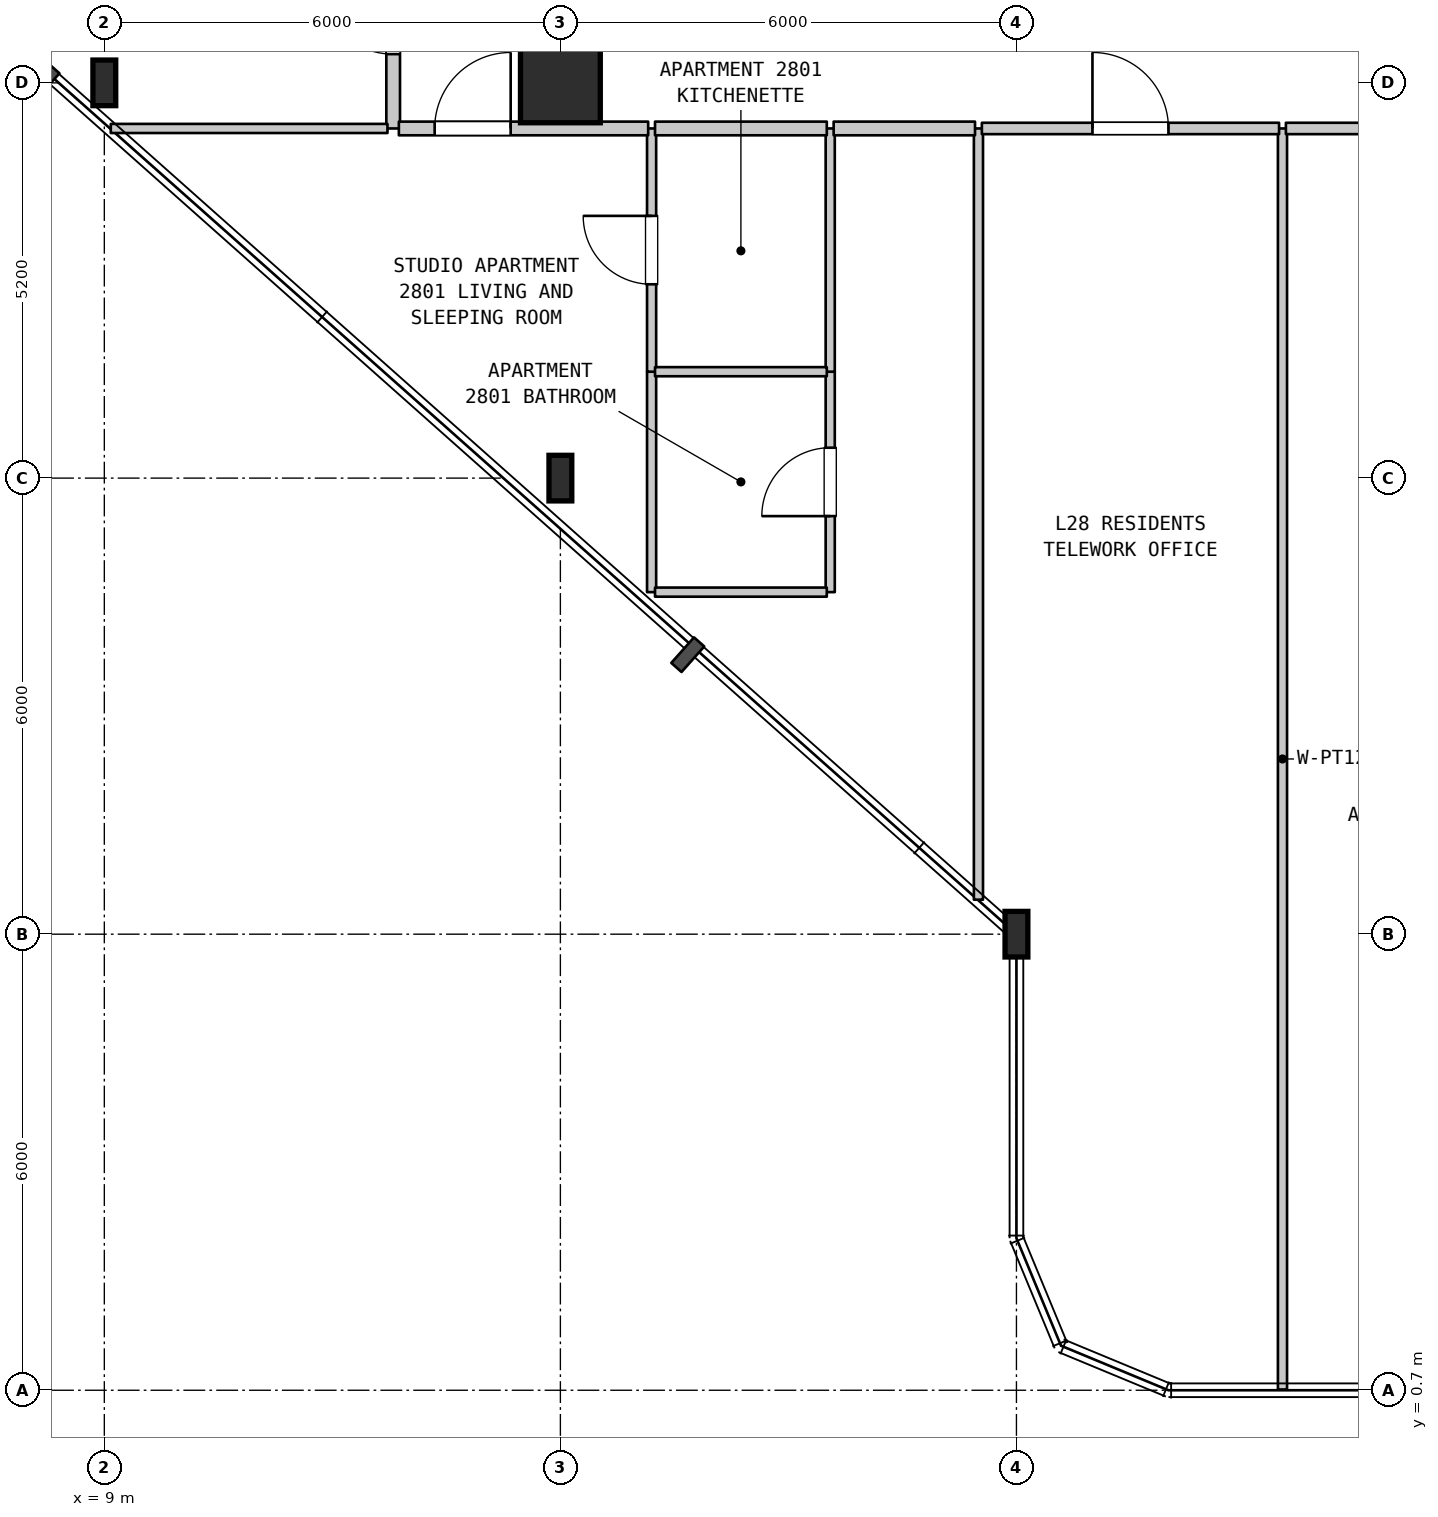
"""IFC4 building model, lengths in metres.
Left out: names, types, materials, properties, quantities, classifications, styles, units other than length and angle.
Written with IfcOpenShell. Run it as: python <this file> out.ifc"""

import sys

from ifc_helpers import new_model, si_unit, direction, frame, frame_2d, origin, origin_2d, place, context, subcontext, project, spatial, rectangle, i_section, extrude, element, fill, save


model = new_model("IFC4")
c1 = context("Model", 3, precision=1e-05, world=origin(), true_north=direction((0.0, 1.0)))
c2 = subcontext(c1, "Body", "Model", "MODEL_VIEW")
j1 = project(units=[si_unit("LENGTHUNIT", "METRE"), si_unit("PLANEANGLEUNIT", "RADIAN")], contexts=[c1])
p1 = place(None, origin())
s1 = spatial("IfcSite", under=j1, at=p1, CompositionType="ELEMENT")
p2 = place(p1, origin())
s2 = spatial("IfcBuilding", under=s1, at=p2, CompositionType="ELEMENT")
p3 = place(p2, frame((0.0, 0.0, 116.8)))
s3 = spatial("IfcBuildingStorey", under=s2, at=p3, CompositionType="ELEMENT", Elevation=116.8)
for number, where, z_axis, x_axis in (
    (1, (9.0, 17.9, 0.0), (0.0, 0.0, 1.0), (1.0, 0.0, 0.0)),
    (2, (15.0, 12.7, 0.0), (0.0, 0.0, 1.0), (1.0, 0.0, 0.0)),
):
    element("IfcColumn", number, at=place(p3, frame(where, z_axis=z_axis, x_axis=x_axis)), inside=s3, PredefinedType="COLUMN", context=c2, shape_type="SweptSolid", body=[
        extrude(i_section(OverallWidth=0.3, OverallDepth=0.6, WebThickness=0.015, FlangeThickness=0.03, FilletRadius=0.027, at=origin_2d()), origin(), (0.0, 0.0, 1.0), 3.7),
    ])
p4 = place(p3, frame((15.0, 17.9, 0.0), z_axis=(0.0, 0.0, 1.0), x_axis=(1.0, 0.0, 0.0)))
e3 = element("IfcColumn", 3, at=p4, inside=s3, PredefinedType="COLUMN", context=c2, shape_type="SweptSolid", body=[
    extrude(rectangle(XDim=1.05, YDim=1.05, at=origin_2d()), origin(), (0.0, 0.0, 1.0), 3.7),
])
p5 = place(p3, frame((21.0, 6.7, 0.0), z_axis=(0.0, 0.0, 1.0), x_axis=(1.0, 0.0, 0.0)))
e4 = element("IfcColumn", 4, at=p5, inside=s3, PredefinedType="COLUMN", context=c2, shape_type="SweptSolid", body=[
    extrude(i_section(OverallWidth=0.3, OverallDepth=0.6, WebThickness=0.015, FlangeThickness=0.03, FilletRadius=0.027, at=origin_2d()), origin(), (0.0, 0.0, 1.0), 3.7),
])
p6 = place(p3, frame((12.8, 17.3, 0.0), z_axis=(0.0, 0.0, 1.0), x_axis=(0.0, 1.0, 0.0)))
e5 = element("IfcWall", 5, at=p6, inside=s3, PredefinedType="STANDARD", context=c2, shape_type="SweptSolid", body=[
    extrude(rectangle(XDim=3.1, YDim=0.18, at=frame_2d((1.55, 0.0))), origin(), (0.0, 0.0, 1.0), 3.38),
])
p7 = place(p6, frame((0.978, 0.0, 0.0)))
e6 = element("IfcOpeningElement", 6, at=p7, cuts=e5, PredefinedType="OPENING", context=c2, shape_type="SweptSolid", body=[
    extrude(rectangle(XDim=1.0, YDim=2.15, at=frame_2d((0.5, 1.075))), frame((0.0, 0.1, 0.0), z_axis=(0.0, -1.0, 0.0), x_axis=(1.0, 0.0, 0.0)), (0.0, 0.0, 1.0), 0.2),
])
p8 = place(p3, frame((16.2, 11.2, 0.0), z_axis=(0.0, 0.0, 1.0), x_axis=(0.0, 1.0, 0.0)))
e7 = element("IfcWall", 7, at=p8, inside=s3, PredefinedType="PARTITIONING", context=c2, shape_type="SweptSolid", body=[
    extrude(rectangle(XDim=2.9, YDim=0.12, at=frame_2d((1.45, 0.0))), origin(), (0.0, 0.0, 1.0), 3.38),
])
p9 = place(p3, frame((16.2, 14.1, 0.0), z_axis=(0.0, 0.0, 1.0), x_axis=(0.0, 1.0, 0.0)))
e8 = element("IfcWall", 8, at=p9, inside=s3, PredefinedType="PARTITIONING", context=c2, shape_type="SweptSolid", body=[
    extrude(rectangle(XDim=3.2, YDim=0.12, at=frame_2d((1.6, 0.0))), origin(), (0.0, 0.0, 1.0), 3.38),
])
p10 = place(p9, frame((1.15, 0.0, 0.0)))
e9 = element("IfcOpeningElement", 9, at=p10, cuts=e8, PredefinedType="OPENING", context=c2, shape_type="SweptSolid", body=[
    extrude(rectangle(XDim=0.9, YDim=2.15, at=frame_2d((0.45, 1.075))), frame((0.0, 0.07, 0.0), z_axis=(0.0, -1.0, 0.0), x_axis=(1.0, 0.0, 0.0)), (0.0, 0.0, 1.0), 0.14),
])
p11 = place(p3, frame((18.55, 11.2, 0.0), z_axis=(0.0, 0.0, 1.0), x_axis=(0.0, 1.0, 0.0)))
e10 = element("IfcWall", 10, at=p11, inside=s3, PredefinedType="PARTITIONING", context=c2, shape_type="SweptSolid", body=[
    extrude(rectangle(XDim=2.9, YDim=0.12, at=frame_2d((1.45, 0.0))), origin(), (0.0, 0.0, 1.0), 3.38),
])
p12 = place(p11, frame((1.0, 0.0, 0.0)))
e11 = element("IfcOpeningElement", 11, at=p12, cuts=e10, PredefinedType="OPENING", context=c2, shape_type="SweptSolid", body=[
    extrude(rectangle(XDim=0.9, YDim=2.1, at=frame_2d((0.45, 1.05))), frame((0.0, 0.07, 0.0), z_axis=(0.0, -1.0, 0.0), x_axis=(1.0, 0.0, 0.0)), (0.0, 0.0, 1.0), 0.14),
])
p13 = place(p3, frame((18.55, 14.1, 0.0), z_axis=(0.0, 0.0, 1.0), x_axis=(0.0, 1.0, 0.0)))
e12 = element("IfcWall", 12, at=p13, inside=s3, PredefinedType="PARTITIONING", context=c2, shape_type="SweptSolid", body=[
    extrude(rectangle(XDim=3.2, YDim=0.12, at=frame_2d((1.6, 0.0))), origin(), (0.0, 0.0, 1.0), 3.38),
])
p14 = place(p3, frame((20.5, 7.154, 0.0), z_axis=(0.0, 0.0, 1.0), x_axis=(0.0, 1.0, 0.0)))
e13 = element("IfcWall", 13, at=p14, inside=s3, PredefinedType="PARTITIONING", context=c2, shape_type="SweptSolid", body=[
    extrude(rectangle(XDim=10.146, YDim=0.12, at=frame_2d((5.073, 0.0))), origin(), (0.0, 0.0, 1.0), 3.38),
])
p15 = place(p3, frame((24.5, 0.71, 0.0), z_axis=(0.0, 0.0, 1.0), x_axis=(0.0, 1.0, 0.0)))
e14 = element("IfcWall", 14, at=p15, inside=s3, PredefinedType="PARTITIONING", context=c2, shape_type="SweptSolid", body=[
    extrude(rectangle(XDim=16.59, YDim=0.12, at=frame_2d((8.295, 0.0))), origin(), (0.0, 0.0, 1.0), 3.38),
])
for number, where, z_axis, x_axis in (
    (15, (16.245, 11.2, 0.0), (0.0, 0.0, 1.0), (1.0, 0.0, 0.0)),
    (16, (16.245, 14.1, 0.0), (0.0, 0.0, 1.0), (1.0, 0.0, 0.0)),
):
    element("IfcWall", number, at=place(p3, frame(where, z_axis=z_axis, x_axis=x_axis)), inside=s3, PredefinedType="PARTITIONING", context=c2, shape_type="SweptSolid", body=[
        extrude(rectangle(XDim=2.26, YDim=0.12, at=frame_2d((1.13, 0.0))), origin(), (0.0, 0.0, 1.0), 3.38),
    ])
p16 = place(p3, frame((9.085, 17.3, 0.0), z_axis=(0.0, 0.0, 1.0), x_axis=(1.0, 0.0, 0.0)))
e17 = element("IfcWall", 17, at=p16, inside=s3, PredefinedType="PARTITIONING", context=c2, shape_type="SweptSolid", body=[
    extrude(rectangle(XDim=3.64, YDim=0.12, at=frame_2d((1.82, 0.0))), origin(), (0.0, 0.0, 1.0), 3.38),
])
p17 = place(p3, frame((12.875, 17.3, 0.0), z_axis=(0.0, 0.0, 1.0), x_axis=(1.0, 0.0, 0.0)))
e18 = element("IfcWall", 18, at=p17, inside=s3, PredefinedType="STANDARD", context=c2, shape_type="SweptSolid", body=[
    extrude(rectangle(XDim=3.28, YDim=0.18, at=frame_2d((1.64, 0.0))), origin(), (0.0, 0.0, 1.0), 3.38),
])
p18 = place(p17, frame((0.471, 0.0, 0.0)))
e19 = element("IfcOpeningElement", 19, at=p18, cuts=e18, PredefinedType="OPENING", context=c2, shape_type="SweptSolid", body=[
    extrude(rectangle(XDim=1.0, YDim=2.15, at=frame_2d((0.5, 1.075))), frame((0.0, 0.1, 0.0), z_axis=(0.0, -1.0, 0.0), x_axis=(1.0, 0.0, 0.0)), (0.0, 0.0, 1.0), 0.2),
])
p19 = place(p3, frame((16.245, 17.3, 0.0), z_axis=(0.0, 0.0, 1.0), x_axis=(1.0, 0.0, 0.0)))
e20 = element("IfcWall", 20, at=p19, inside=s3, PredefinedType="STANDARD", context=c2, shape_type="SweptSolid", body=[
    extrude(rectangle(XDim=2.26, YDim=0.18, at=frame_2d((1.13, 0.0))), origin(), (0.0, 0.0, 1.0), 3.38),
])
p20 = place(p3, frame((18.595, 17.3, 0.0), z_axis=(0.0, 0.0, 1.0), x_axis=(1.0, 0.0, 0.0)))
e21 = element("IfcWall", 21, at=p20, inside=s3, PredefinedType="STANDARD", context=c2, shape_type="SweptSolid", body=[
    extrude(rectangle(XDim=1.86, YDim=0.18, at=frame_2d((0.93, 0.0))), origin(), (0.0, 0.0, 1.0), 3.38),
])
p21 = place(p3, frame((20.545, 17.3, 0.0), z_axis=(0.0, 0.0, 1.0), x_axis=(1.0, 0.0, 0.0)))
e22 = element("IfcWall", 22, at=p21, inside=s3, PredefinedType="STANDARD", context=c2, shape_type="SweptSolid", body=[
    extrude(rectangle(XDim=3.91, YDim=0.15, at=frame_2d((1.955, 0.0))), origin(), (0.0, 0.0, 1.0), 3.38),
])
p22 = place(p21, frame((1.455, 0.0, 0.0)))
e23 = element("IfcOpeningElement", 23, at=p22, cuts=e22, PredefinedType="OPENING", context=c2, shape_type="SweptSolid", body=[
    extrude(rectangle(XDim=1.0, YDim=2.15, at=frame_2d((0.5, 1.075))), frame((0.0, 0.085, 0.0), z_axis=(0.0, -1.0, 0.0), x_axis=(1.0, 0.0, 0.0)), (0.0, 0.0, 1.0), 0.17),
])
p23 = place(p3, frame((24.545, 17.3, 0.0), z_axis=(0.0, 0.0, 1.0), x_axis=(1.0, 0.0, 0.0)))
e24 = element("IfcWall", 24, at=p23, inside=s3, PredefinedType="STANDARD", context=c2, shape_type="SweptSolid", body=[
    extrude(rectangle(XDim=4.21, YDim=0.15, at=frame_2d((2.105, 0.0))), origin(), (0.0, 0.0, 1.0), 3.38),
])
p24 = place(p23, frame((1.605, 0.0, 0.0)))
e25 = element("IfcOpeningElement", 25, at=p24, cuts=e24, PredefinedType="OPENING", context=c2, shape_type="SweptSolid", body=[
    extrude(rectangle(XDim=1.0, YDim=2.15, at=frame_2d((0.5, 1.075))), frame((0.0, 0.085, 0.0), z_axis=(0.0, -1.0, 0.0), x_axis=(1.0, 0.0, 0.0)), (0.0, 0.0, 1.0), 0.17),
])
p25 = place(p7, origin())
e26 = element("IfcDoor", 26, at=p25, inside=s3, OperationType="SINGLE_SWING_RIGHT", PredefinedType="DOOR", context=c2, shape_type="SweptSolid", body=[
    extrude(rectangle(XDim=1.0, YDim=2.15, at=frame_2d((0.5, 1.075))), frame((0.0, 0.025, 0.0), z_axis=(0.0, -1.0, 0.0), x_axis=(1.0, 0.0, 0.0)), (0.0, 0.0, 1.0), 0.05),
])
fill(e6, e26)
p26 = place(p10, origin())
e27 = element("IfcDoor", 27, at=p26, inside=s3, OperationType="SINGLE_SWING_RIGHT", PredefinedType="DOOR", context=c2, shape_type="SweptSolid", body=[
    extrude(rectangle(XDim=0.9, YDim=2.15, at=frame_2d((0.45, 1.075))), frame((0.0, 0.025, 0.0), z_axis=(0.0, -1.0, 0.0), x_axis=(1.0, 0.0, 0.0)), (0.0, 0.0, 1.0), 0.05),
])
fill(e9, e27)
p27 = place(p12, origin())
e28 = element("IfcDoor", 28, at=p27, inside=s3, OperationType="SINGLE_SWING_LEFT", PredefinedType="DOOR", context=c2, shape_type="SweptSolid", body=[
    extrude(rectangle(XDim=0.9, YDim=2.1, at=frame_2d((0.45, 1.05))), frame((0.0, 0.025, 0.0), z_axis=(0.0, -1.0, 0.0), x_axis=(1.0, 0.0, 0.0)), (0.0, 0.0, 1.0), 0.05),
])
fill(e11, e28)
p28 = place(p18, origin())
e29 = element("IfcDoor", 29, at=p28, inside=s3, OperationType="SINGLE_SWING_RIGHT", PredefinedType="DOOR", context=c2, shape_type="SweptSolid", body=[
    extrude(rectangle(XDim=1.0, YDim=2.15, at=frame_2d((0.5, 1.075))), frame((0.0, 0.025, 0.0), z_axis=(0.0, -1.0, 0.0), x_axis=(1.0, 0.0, 0.0)), (0.0, 0.0, 1.0), 0.05),
])
fill(e19, e29)
p29 = place(p22, origin())
e30 = element("IfcDoor", 30, at=p29, inside=s3, OperationType="SINGLE_SWING_LEFT", PredefinedType="DOOR", context=c2, shape_type="SweptSolid", body=[
    extrude(rectangle(XDim=1.0, YDim=2.15, at=frame_2d((0.5, 1.075))), frame((0.0, 0.025, 0.0), z_axis=(0.0, -1.0, 0.0), x_axis=(1.0, 0.0, 0.0)), (0.0, 0.0, 1.0), 0.05),
])
fill(e23, e30)
save(model, sys.argv[1])
